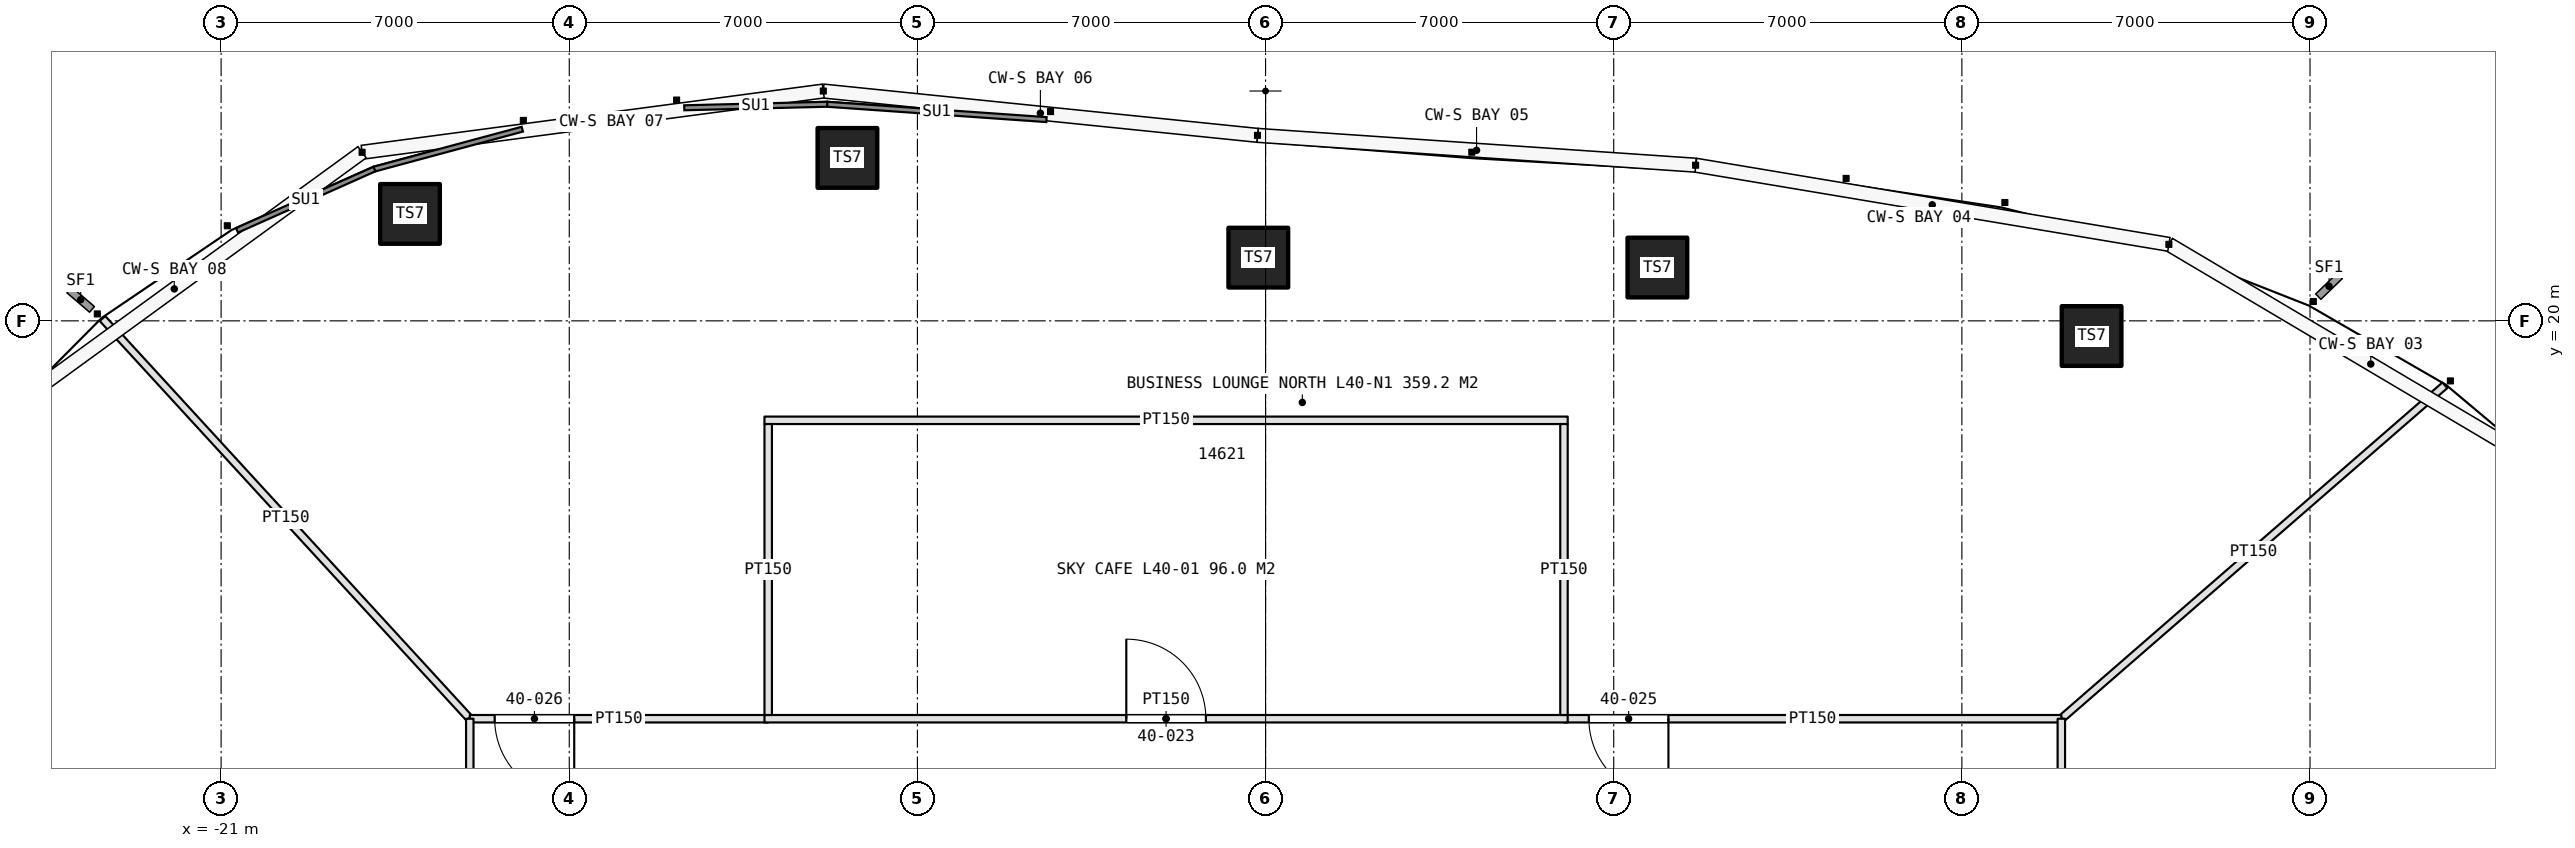
"""IFC4 building model, lengths in metres.
Left out: names, types, materials, properties, quantities, classifications, styles, units other than length and angle.
Written with IfcOpenShell. Run it as: python <this file> out.ifc"""

import sys

from ifc_helpers import new_model, si_unit, direction, frame, frame_2d, origin, origin_2d, place, context, subcontext, project, spatial, rectangle, hollow_rectangle, extrude, element, fill, save


model = new_model("IFC4")
c1 = context("Model", 3, precision=1e-05, world=origin(), true_north=direction((0.0, 1.0)))
c2 = subcontext(c1, "Body", "Model", "MODEL_VIEW")
j1 = project(units=[si_unit("LENGTHUNIT", "METRE"), si_unit("PLANEANGLEUNIT", "RADIAN")], contexts=[c1])
p1 = place(None, origin())
s1 = spatial("IfcSite", under=j1, at=p1, CompositionType="ELEMENT")
p2 = place(p1, origin())
s2 = spatial("IfcBuilding", under=s1, at=p2, CompositionType="ELEMENT")
p3 = place(p2, frame((0.0, 0.0, 184.8)))
s3 = spatial("IfcBuildingStorey", under=s2, at=p3, CompositionType="ELEMENT", Elevation=184.8)
for number, where, z_axis, x_axis in (
    (1, (16.608, 19.695, 0.0), (0.0, 0.0, 1.0), (1.0, 0.0, 0.0)),
    (2, (7.878, 21.072, 0.0), (0.0, 0.0, 1.0), (1.0, 0.0, 0.0)),
    (3, (-0.146, 21.271, 0.0), (0.0, 0.0, 1.0), (1.0, 0.0, 0.0)),
):
    element("IfcColumn", number, at=place(p3, frame(where, z_axis=z_axis, x_axis=x_axis)), inside=s3, PredefinedType="COLUMN", context=c2, shape_type="SweptSolid", body=[
        extrude(hollow_rectangle(XDim=1.2, YDim=1.2, WallThickness=0.12, at=origin_2d()), origin(), (0.0, 0.0, 1.0), 5.0),
    ])
for number, where, z_axis, x_axis in (
    (4, (-8.407, 23.276, 0.0), (0.0, 0.0, 1.0), (1.0, 0.0, 0.0)),
    (5, (-17.202, 22.15, 0.0), (0.0, 0.0, 1.0), (1.0, 0.0, 0.0)),
):
    element("IfcColumn", number, at=place(p3, frame(where, z_axis=z_axis, x_axis=x_axis)), inside=s3, PredefinedType="COLUMN", context=c2, shape_type="SweptSolid", body=[
        extrude(hollow_rectangle(XDim=1.2, YDim=1.2, WallThickness=0.12, at=origin_2d()), origin(), (0.0, 0.0, 1.0), 4.225),
    ])
p4 = place(p3, frame((-16.013, 12.015, 0.0), z_axis=(0.0, 0.0, 1.0), x_axis=(-0.676167685567, 0.73674775941, 0.0)))
e6 = element("IfcWall", 6, at=p4, inside=s3, PredefinedType="PARTITIONING", context=c2, shape_type="SweptSolid", body=[
    extrude(rectangle(XDim=10.901, YDim=0.15, at=frame_2d((5.451, 0.0))), origin(), (0.0, 0.0, 1.0), 3.6),
])
p5 = place(p3, frame((16.015, 12.013, 0.0), z_axis=(0.0, 0.0, 1.0), x_axis=(0.754689007548, 0.656082694397, 0.0)))
e7 = element("IfcWall", 7, at=p5, inside=s3, PredefinedType="PARTITIONING", context=c2, shape_type="SweptSolid", body=[
    extrude(rectangle(XDim=10.198, YDim=0.15, at=frame_2d((5.099, 0.0))), origin(), (0.0, 0.0, 1.0), 3.6),
])
p6 = place(p3, frame((-10.0, 12.0, 0.0), z_axis=(0.0, 0.0, 1.0), x_axis=(-1.0, 0.0, 0.0)))
e8 = element("IfcWall", 8, at=p6, inside=s3, PredefinedType="PARTITIONING", context=c2, shape_type="SweptSolid", body=[
    extrude(rectangle(XDim=6.0, YDim=0.15, at=frame_2d((3.0, 0.0))), origin(), (0.0, 0.0, 1.0), 3.6),
])
p7 = place(p6, frame((3.9, 0.0, 0.0)))
e9 = element("IfcOpeningElement", 9, at=p7, cuts=e8, PredefinedType="OPENING", context=c2, shape_type="SweptSolid", body=[
    extrude(rectangle(XDim=1.6, YDim=2.4, at=frame_2d((0.8, 1.2))), frame((0.0, 0.085, 0.0), z_axis=(0.0, -1.0, 0.0), x_axis=(1.0, 0.0, 0.0)), (0.0, 0.0, 1.0), 0.17),
])
p8 = place(p3, frame((16.0, 12.0, 0.0), z_axis=(0.0, 0.0, 1.0), x_axis=(-1.0, 0.0, 0.0)))
e10 = element("IfcWall", 10, at=p8, inside=s3, PredefinedType="PARTITIONING", context=c2, shape_type="SweptSolid", body=[
    extrude(rectangle(XDim=10.0, YDim=0.15, at=frame_2d((5.0, 0.0))), origin(), (0.0, 0.0, 1.0), 3.6),
])
p9 = place(p8, frame((7.9, 0.0, 0.0)))
e11 = element("IfcOpeningElement", 11, at=p9, cuts=e10, PredefinedType="OPENING", context=c2, shape_type="SweptSolid", body=[
    extrude(rectangle(XDim=1.6, YDim=2.4, at=frame_2d((0.8, 1.2))), frame((0.0, 0.085, 0.0), z_axis=(0.0, -1.0, 0.0), x_axis=(1.0, 0.0, 0.0)), (0.0, 0.0, 1.0), 0.17),
])
p10 = place(p3, frame((16.0, -12.0, 0.0), z_axis=(0.0, 0.0, 1.0), x_axis=(0.0, 1.0, 0.0)))
e12 = element("IfcWall", 12, at=p10, inside=s3, PredefinedType="PARTITIONING", context=c2, shape_type="SweptSolid", body=[
    extrude(rectangle(XDim=24.0, YDim=0.15, at=frame_2d((12.0, 0.0))), origin(), (0.0, 0.0, 1.0), 3.6),
])
p11 = place(p10, frame((12.4, 0.0, 0.0)))
e13 = element("IfcOpeningElement", 13, at=p11, cuts=e12, PredefinedType="OPENING", context=c2, shape_type="SweptSolid", body=[
    extrude(rectangle(XDim=1.6, YDim=2.4, at=frame_2d((0.8, 1.2))), frame((0.0, 0.085, 0.0), z_axis=(0.0, -1.0, 0.0), x_axis=(1.0, 0.0, 0.0)), (0.0, 0.0, 1.0), 0.17),
])
p12 = place(p10, frame((0.75, 0.0, 0.0)))
e14 = element("IfcOpeningElement", 14, at=p12, cuts=e12, PredefinedType="OPENING", context=c2, shape_type="SweptSolid", body=[
    extrude(rectangle(XDim=1.6, YDim=2.4, at=frame_2d((0.8, 1.2))), frame((0.0, 0.085, 0.0), z_axis=(0.0, -1.0, 0.0), x_axis=(1.0, 0.0, 0.0)), (0.0, 0.0, 1.0), 0.17),
])
p13 = place(p3, frame((-16.0, 12.0, 0.0), z_axis=(0.0, 0.0, 1.0), x_axis=(0.0, -1.0, 0.0)))
e15 = element("IfcWall", 15, at=p13, inside=s3, PredefinedType="PARTITIONING", context=c2, shape_type="SweptSolid", body=[
    extrude(rectangle(XDim=24.0, YDim=0.15, at=frame_2d((12.0, 0.0))), origin(), (0.0, 0.0, 1.0), 3.6),
])
p14 = place(p13, frame((9.9, 0.0, 0.0)))
e16 = element("IfcOpeningElement", 16, at=p14, cuts=e15, PredefinedType="OPENING", context=c2, shape_type="SweptSolid", body=[
    extrude(rectangle(XDim=1.6, YDim=2.4, at=frame_2d((0.8, 1.2))), frame((0.0, 0.085, 0.0), z_axis=(0.0, -1.0, 0.0), x_axis=(1.0, 0.0, 0.0)), (0.0, 0.0, 1.0), 0.17),
])
p15 = place(p13, frame((21.9, 0.0, 0.0)))
e17 = element("IfcOpeningElement", 17, at=p15, cuts=e15, PredefinedType="OPENING", context=c2, shape_type="SweptSolid", body=[
    extrude(rectangle(XDim=1.6, YDim=2.4, at=frame_2d((0.8, 1.2))), frame((0.0, 0.085, 0.0), z_axis=(0.0, -1.0, 0.0), x_axis=(1.0, 0.0, 0.0)), (0.0, 0.0, 1.0), 0.17),
])
p16 = place(p3, frame((-10.075, 12.0, 0.0), z_axis=(0.0, 0.0, 1.0), x_axis=(1.0, 0.0, 0.0)))
e18 = element("IfcWall", 18, at=p16, inside=s3, PredefinedType="PARTITIONING", context=c2, shape_type="SweptSolid", body=[
    extrude(rectangle(XDim=16.15, YDim=0.15, at=frame_2d((8.075, 0.0))), origin(), (0.0, 0.0, 1.0), 3.6),
])
p17 = place(p16, frame((7.275, 0.0, 0.0)))
e19 = element("IfcOpeningElement", 19, at=p17, cuts=e18, PredefinedType="OPENING", context=c2, shape_type="SweptSolid", body=[
    extrude(rectangle(XDim=1.6, YDim=2.4, at=frame_2d((0.8, 1.2))), frame((0.0, 0.085, 0.0), z_axis=(0.0, -1.0, 0.0), x_axis=(1.0, 0.0, 0.0)), (0.0, 0.0, 1.0), 0.17),
])
p18 = place(p3, frame((-10.075, 18.0, 0.0), z_axis=(0.0, 0.0, 1.0), x_axis=(1.0, 0.0, 0.0)))
e20 = element("IfcWall", 20, at=p18, inside=s3, PredefinedType="PARTITIONING", context=c2, shape_type="SweptSolid", body=[
    extrude(rectangle(XDim=16.15, YDim=0.15, at=frame_2d((8.075, 0.0))), origin(), (0.0, 0.0, 1.0), 3.6),
])
for number, where, z_axis, x_axis in (
    (21, (-10.0, 12.075, 0.0), (0.0, 0.0, 1.0), (0.0, 1.0, 0.0)),
    (22, (6.0, 12.075, 0.0), (0.0, 0.0, 1.0), (0.0, 1.0, 0.0)),
):
    element("IfcWall", number, at=place(p3, frame(where, z_axis=z_axis, x_axis=x_axis)), inside=s3, PredefinedType="PARTITIONING", context=c2, shape_type="SweptSolid", body=[
        extrude(rectangle(XDim=5.85, YDim=0.15, at=frame_2d((2.925, 0.0))), origin(), (0.0, 0.0, 1.0), 3.6),
    ])
p19 = place(p17, origin())
e23 = element("IfcDoor", 23, at=p19, inside=s3, OperationType="DOUBLE_DOOR_SINGLE_SWING", PredefinedType="DOOR", context=c2, shape_type="SweptSolid", body=[
    extrude(rectangle(XDim=1.6, YDim=2.4, at=frame_2d((0.8, 1.2))), frame((0.0, 0.025, 0.0), z_axis=(0.0, -1.0, 0.0), x_axis=(1.0, 0.0, 0.0)), (0.0, 0.0, 1.0), 0.05),
])
fill(e19, e23)
p20 = place(p9, origin())
e24 = element("IfcDoor", 24, at=p20, inside=s3, OperationType="DOUBLE_DOOR_SINGLE_SWING", PredefinedType="DOOR", context=c2, shape_type="SweptSolid", body=[
    extrude(rectangle(XDim=1.6, YDim=2.4, at=frame_2d((0.8, 1.2))), frame((0.0, 0.025, 0.0), z_axis=(0.0, -1.0, 0.0), x_axis=(1.0, 0.0, 0.0)), (0.0, 0.0, 1.0), 0.05),
])
fill(e11, e24)
p21 = place(p7, origin())
e25 = element("IfcDoor", 25, at=p21, inside=s3, OperationType="DOUBLE_DOOR_SINGLE_SWING", PredefinedType="DOOR", context=c2, shape_type="SweptSolid", body=[
    extrude(rectangle(XDim=1.6, YDim=2.4, at=frame_2d((0.8, 1.2))), frame((0.0, 0.025, 0.0), z_axis=(0.0, -1.0, 0.0), x_axis=(1.0, 0.0, 0.0)), (0.0, 0.0, 1.0), 0.05),
])
fill(e9, e25)
save(model, sys.argv[1])
